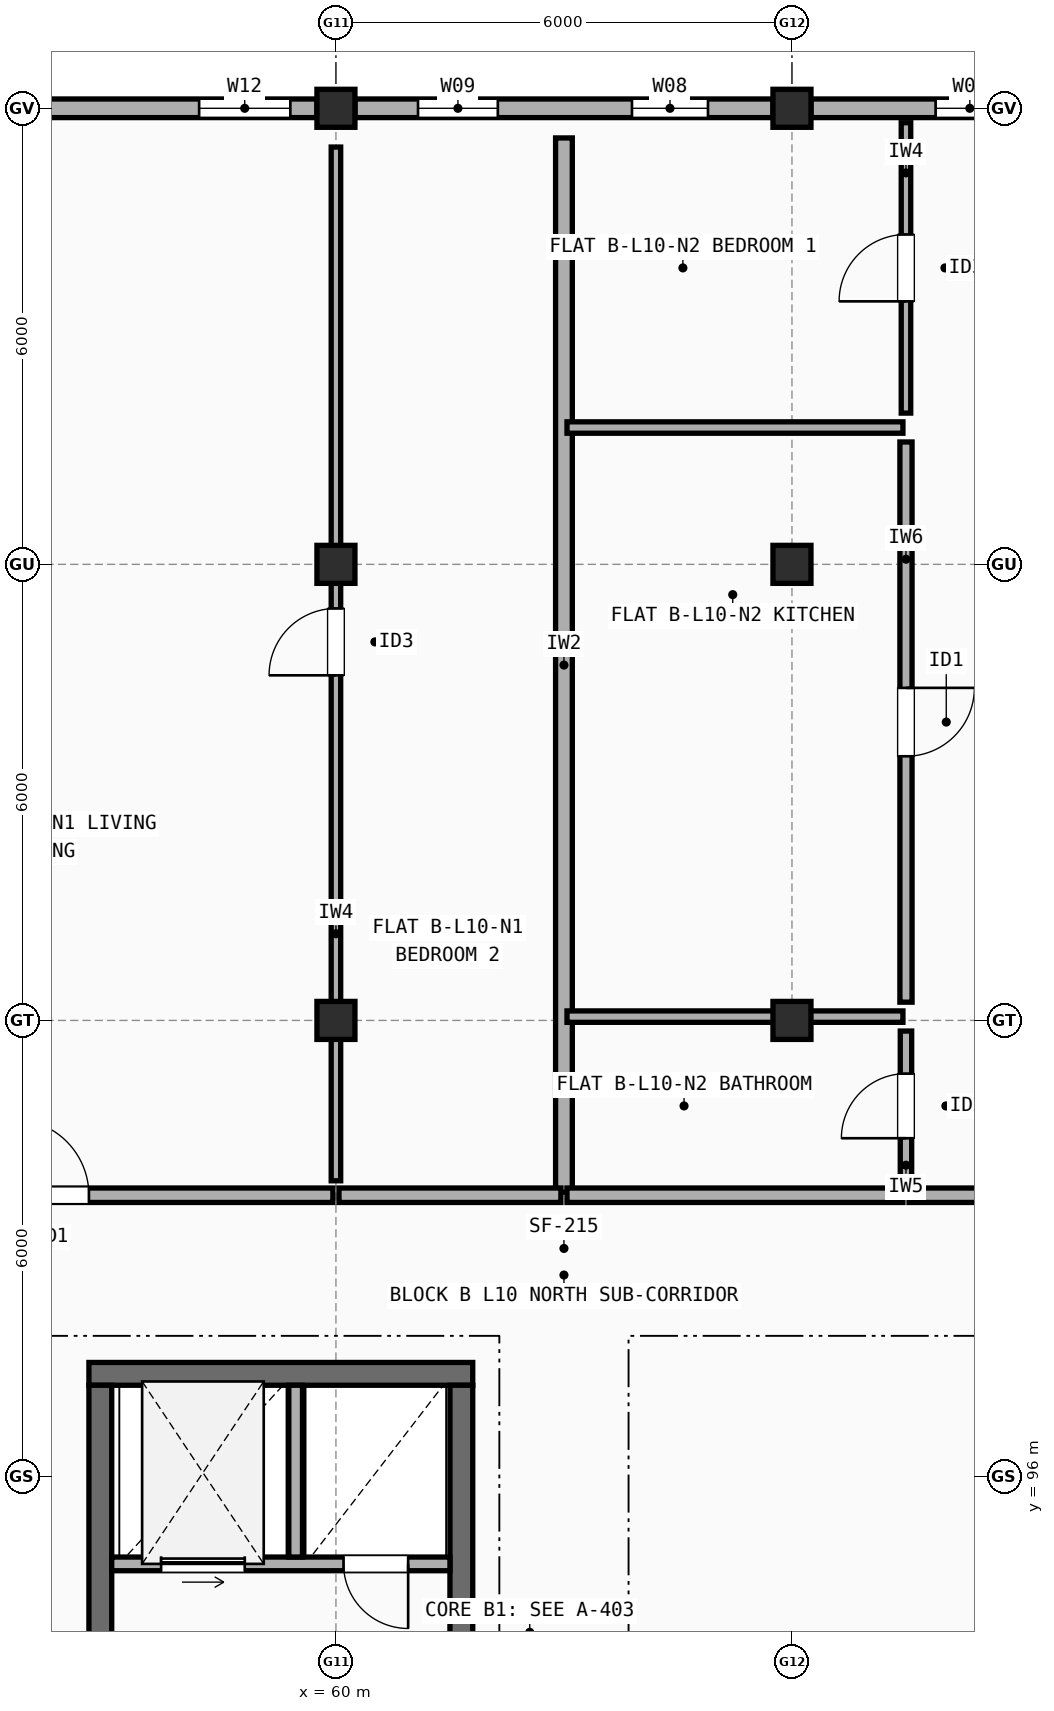
"""IFC4 building model, lengths in metres.
Left out: names, types, materials, properties, quantities, classifications, styles, units other than length and angle.
Written with IfcOpenShell. Run it as: python <this file> out.ifc"""

import sys

from ifc_helpers import new_model, si_unit, direction, frame, frame_2d, origin, origin_2d, place, context, subcontext, project, spatial, rectangle, extrude, element, fill, save


model = new_model("IFC4")
c1 = context("Model", 3, precision=1e-05, world=origin(), true_north=direction((0.0, 1.0)))
c2 = subcontext(c1, "Body", "Model", "MODEL_VIEW")
j1 = project(units=[si_unit("LENGTHUNIT", "METRE"), si_unit("PLANEANGLEUNIT", "RADIAN")], contexts=[c1])
p1 = place(None, origin())
s1 = spatial("IfcSite", under=j1, at=p1, CompositionType="ELEMENT")
p2 = place(p1, origin())
s2 = spatial("IfcBuilding", under=s1, at=p2, CompositionType="ELEMENT")
p3 = place(p2, frame((0.0, 0.0, 33.3)))
s3 = spatial("IfcBuildingStorey", under=s2, at=p3, CompositionType="ELEMENT", Elevation=33.3)
for number, where, z_axis, x_axis in (
    (1, (60.0, 102.0, 0.0), (0.0, 0.0, 1.0), (1.0, 0.0, 0.0)),
    (2, (60.0, 108.0, 0.0), (0.0, 0.0, 1.0), (1.0, 0.0, 0.0)),
    (3, (60.0, 114.0, 0.0), (0.0, 0.0, 1.0), (1.0, 0.0, 0.0)),
    (4, (66.0, 102.0, 0.0), (0.0, 0.0, 1.0), (1.0, 0.0, 0.0)),
    (5, (66.0, 108.0, 0.0), (0.0, 0.0, 1.0), (1.0, 0.0, 0.0)),
    (6, (66.0, 114.0, 0.0), (0.0, 0.0, 1.0), (1.0, 0.0, 0.0)),
):
    element("IfcColumn", number, at=place(p3, frame(where, z_axis=z_axis, x_axis=x_axis)), inside=s3, PredefinedType="COLUMN", context=c2, shape_type="SweptSolid", body=[
        extrude(rectangle(XDim=0.5, YDim=0.5, at=origin_2d()), origin(), (0.0, 0.0, 1.0), 2.99),
    ])
p4 = place(p3, frame((71.75, 114.0, 0.0), z_axis=(0.0, 0.0, 1.0), x_axis=(-1.0, 0.0, 0.0)))
e7 = element("IfcWall", 7, at=p4, inside=s3, PredefinedType="STANDARD", context=c2, shape_type="SweptSolid", body=[
    extrude(rectangle(XDim=5.5, YDim=0.245, at=frame_2d((2.75, 0.0))), origin(), (0.0, 0.0, 1.0), 2.472),
])
p5 = place(p4, frame((0.35, 0.0, 0.9)))
e8 = element("IfcOpeningElement", 8, at=p5, cuts=e7, PredefinedType="OPENING", context=c2, shape_type="SweptSolid", body=[
    extrude(rectangle(XDim=0.9, YDim=1.4, at=frame_2d((0.45, 0.7))), frame((0.0, 0.133, 0.0), z_axis=(0.0, -1.0, 0.0), x_axis=(1.0, 0.0, 0.0)), (0.0, 0.0, 1.0), 0.265),
])
p6 = place(p4, frame((2.96, 0.0, 0.9)))
e9 = element("IfcOpeningElement", 9, at=p6, cuts=e7, PredefinedType="OPENING", context=c2, shape_type="SweptSolid", body=[
    extrude(rectangle(XDim=0.9, YDim=1.4, at=frame_2d((0.45, 0.7))), frame((0.0, 0.133, 0.0), z_axis=(0.0, -1.0, 0.0), x_axis=(1.0, 0.0, 0.0)), (0.0, 0.0, 1.0), 0.265),
])
p7 = place(p3, frame((65.75, 114.0, 0.0), z_axis=(0.0, 0.0, 1.0), x_axis=(-1.0, 0.0, 0.0)))
e10 = element("IfcWall", 10, at=p7, inside=s3, PredefinedType="STANDARD", context=c2, shape_type="SweptSolid", body=[
    extrude(rectangle(XDim=5.5, YDim=0.245, at=frame_2d((2.75, 0.0))), origin(), (0.0, 0.0, 1.0), 2.472),
])
p8 = place(p7, frame((0.855, 0.0, 0.9)))
e11 = element("IfcOpeningElement", 11, at=p8, cuts=e10, PredefinedType="OPENING", context=c2, shape_type="SweptSolid", body=[
    extrude(rectangle(XDim=1.0, YDim=1.4, at=frame_2d((0.5, 0.7))), frame((0.0, 0.133, 0.0), z_axis=(0.0, -1.0, 0.0), x_axis=(1.0, 0.0, 0.0)), (0.0, 0.0, 1.0), 0.265),
])
p9 = place(p7, frame((3.62, 0.0, 0.9)))
e12 = element("IfcOpeningElement", 12, at=p9, cuts=e10, PredefinedType="OPENING", context=c2, shape_type="SweptSolid", body=[
    extrude(rectangle(XDim=1.05, YDim=1.35, at=frame_2d((0.525, 0.675))), frame((0.0, 0.133, 0.0), z_axis=(0.0, -1.0, 0.0), x_axis=(1.0, 0.0, 0.0)), (0.0, 0.0, 1.0), 0.265),
])
p10 = place(p3, frame((59.75, 114.0, 0.0), z_axis=(0.0, 0.0, 1.0), x_axis=(-1.0, 0.0, 0.0)))
e13 = element("IfcWall", 13, at=p10, inside=s3, PredefinedType="STANDARD", context=c2, shape_type="SweptSolid", body=[
    extrude(rectangle(XDim=5.5, YDim=0.245, at=frame_2d((2.75, 0.0))), origin(), (0.0, 0.0, 1.0), 2.472),
])
p11 = place(p10, frame((0.35, 0.0, 0.9)))
e14 = element("IfcOpeningElement", 14, at=p11, cuts=e13, PredefinedType="OPENING", context=c2, shape_type="SweptSolid", body=[
    extrude(rectangle(XDim=1.2, YDim=1.35, at=frame_2d((0.6, 0.675))), frame((0.0, 0.133, 0.0), z_axis=(0.0, -1.0, 0.0), x_axis=(1.0, 0.0, 0.0)), (0.0, 0.0, 1.0), 0.265),
])
p12 = place(p10, frame((3.95, 0.0, 0.9)))
e15 = element("IfcOpeningElement", 15, at=p12, cuts=e13, PredefinedType="OPENING", context=c2, shape_type="SweptSolid", body=[
    extrude(rectangle(XDim=1.2, YDim=1.35, at=frame_2d((0.6, 0.675))), frame((0.0, 0.133, 0.0), z_axis=(0.0, -1.0, 0.0), x_axis=(1.0, 0.0, 0.0)), (0.0, 0.0, 1.0), 0.265),
])
p13 = place(p3, frame((61.8, 97.35, 0.0), z_axis=(0.0, 0.0, 1.0), x_axis=(-1.0, 0.0, 0.0)))
e16 = element("IfcWall", 16, at=p13, inside=s3, PredefinedType="SHEAR", context=c2, shape_type="SweptSolid", body=[
    extrude(rectangle(XDim=5.05, YDim=0.3, at=frame_2d((2.525, 0.0))), origin(), (0.0, 0.0, 1.0), 2.99),
])
p14 = place(p3, frame((61.65, 90.75, 0.0), z_axis=(0.0, 0.0, 1.0), x_axis=(0.0, 1.0, 0.0)))
e17 = element("IfcWall", 17, at=p14, inside=s3, PredefinedType="SHEAR", context=c2, shape_type="SweptSolid", body=[
    extrude(rectangle(XDim=6.45, YDim=0.3, at=frame_2d((3.225, 0.0))), origin(), (0.0, 0.0, 1.0), 2.99),
])
p15 = place(p3, frame((56.9, 93.75, 0.0), z_axis=(0.0, 0.0, 1.0), x_axis=(0.0, 1.0, 0.0)))
e18 = element("IfcWall", 18, at=p15, inside=s3, PredefinedType="SHEAR", context=c2, shape_type="SweptSolid", body=[
    extrude(rectangle(XDim=3.45, YDim=0.3, at=frame_2d((1.725, 0.0))), origin(), (0.0, 0.0, 1.0), 2.99),
])
p16 = place(p3, frame((57.05, 94.85, 0.0), z_axis=(0.0, 0.0, 1.0), x_axis=(1.0, 0.0, 0.0)))
e19 = element("IfcWall", 19, at=p16, inside=s3, PredefinedType="SOLIDWALL", context=c2, shape_type="SweptSolid", body=[
    extrude(rectangle(XDim=4.45, YDim=0.18, at=frame_2d((2.225, 0.0))), origin(), (0.0, 0.0, 1.0), 2.99),
])
p17 = place(p16, frame((0.65, 0.0, 0.0)))
e20 = element("IfcOpeningElement", 20, at=p17, cuts=e19, PredefinedType="OPENING", context=c2, shape_type="SweptSolid", body=[
    extrude(rectangle(XDim=1.1, YDim=2.15, at=frame_2d((0.55, 1.075))), frame((0.0, 0.1, 0.0), z_axis=(0.0, -1.0, 0.0), x_axis=(1.0, 0.0, 0.0)), (0.0, 0.0, 1.0), 0.2),
])
p18 = place(p16, frame((3.05, 0.0, 0.0)))
e21 = element("IfcOpeningElement", 21, at=p18, cuts=e19, PredefinedType="OPENING", context=c2, shape_type="SweptSolid", body=[
    extrude(rectangle(XDim=0.85, YDim=2.1, at=frame_2d((0.425, 1.05))), frame((0.0, 0.1, 0.0), z_axis=(0.0, -1.0, 0.0), x_axis=(1.0, 0.0, 0.0)), (0.0, 0.0, 1.0), 0.2),
])
p19 = place(p3, frame((59.47, 94.94, 0.0), z_axis=(0.0, 0.0, 1.0), x_axis=(0.0, 1.0, 0.0)))
e22 = element("IfcWall", 22, at=p19, inside=s3, PredefinedType="SOLIDWALL", context=c2, shape_type="SweptSolid", body=[
    extrude(rectangle(XDim=2.26, YDim=0.18, at=frame_2d((1.13, 0.0))), origin(), (0.0, 0.0, 1.0), 2.99),
])
p20 = place(p3, frame((63.0, 99.74, 0.0), z_axis=(0.0, 0.0, 1.0), x_axis=(0.0, 1.0, 0.0)))
e23 = element("IfcWall", 23, at=p20, inside=s3, PredefinedType="SOLIDWALL", context=c2, shape_type="SweptSolid", body=[
    extrude(rectangle(XDim=13.87, YDim=0.22, at=frame_2d((6.935, 0.0))), origin(), (0.0, 0.0, 1.0), 2.472),
])
p21 = place(p3, frame((52.54, 99.7, 0.0), z_axis=(0.0, 0.0, 1.0), x_axis=(1.0, 0.0, 0.0)))
e24 = element("IfcWall", 24, at=p21, inside=s3, PredefinedType="SOLIDWALL", context=c2, shape_type="SweptSolid", body=[
    extrude(rectangle(XDim=7.42, YDim=0.19, at=frame_2d((3.71, 0.0))), origin(), (0.0, 0.0, 1.0), 2.508),
])
p22 = place(p21, frame((3.21, 0.0, 0.0)))
e25 = element("IfcOpeningElement", 25, at=p22, cuts=e24, PredefinedType="OPENING", context=c2, shape_type="SweptSolid", body=[
    extrude(rectangle(XDim=1.0, YDim=2.15, at=frame_2d((0.5, 1.075))), frame((0.0, 0.105, 0.0), z_axis=(0.0, -1.0, 0.0), x_axis=(1.0, 0.0, 0.0)), (0.0, 0.0, 1.0), 0.21),
])
p23 = place(p3, frame((60.04, 99.7, 0.0), z_axis=(0.0, 0.0, 1.0), x_axis=(1.0, 0.0, 0.0)))
e26 = element("IfcWall", 26, at=p23, inside=s3, PredefinedType="SOLIDWALL", context=c2, shape_type="SweptSolid", body=[
    extrude(rectangle(XDim=2.92, YDim=0.19, at=frame_2d((1.46, 0.0))), origin(), (0.0, 0.0, 1.0), 2.508),
])
p24 = place(p3, frame((60.0, 99.89, 0.0), z_axis=(0.0, 0.0, 1.0), x_axis=(0.0, 1.0, 0.0)))
e27 = element("IfcWall", 27, at=p24, inside=s3, PredefinedType="PARTITIONING", context=c2, shape_type="SweptSolid", body=[
    extrude(rectangle(XDim=13.6, YDim=0.125, at=frame_2d((6.8, 0.0))), origin(), (0.0, 0.0, 1.0), 2.508),
])
p25 = place(p24, frame((6.65, 0.0, 0.0)))
e28 = element("IfcOpeningElement", 28, at=p25, cuts=e27, PredefinedType="OPENING", context=c2, shape_type="SweptSolid", body=[
    extrude(rectangle(XDim=0.88, YDim=2.1, at=frame_2d((0.44, 1.05))), frame((0.0, 0.073, 0.0), z_axis=(0.0, -1.0, 0.0), x_axis=(1.0, 0.0, 0.0)), (0.0, 0.0, 1.0), 0.145),
])
p26 = place(p3, frame((63.04, 99.7, 0.0), z_axis=(0.0, 0.0, 1.0), x_axis=(1.0, 0.0, 0.0)))
e29 = element("IfcWall", 29, at=p26, inside=s3, PredefinedType="SOLIDWALL", context=c2, shape_type="SweptSolid", body=[
    extrude(rectangle(XDim=4.42, YDim=0.19, at=frame_2d((2.21, 0.0))), origin(), (0.0, 0.0, 1.0), 2.99),
])
p27 = place(p3, frame((67.54, 99.7, 0.0), z_axis=(0.0, 0.0, 1.0), x_axis=(1.0, 0.0, 0.0)))
e30 = element("IfcWall", 30, at=p27, inside=s3, PredefinedType="SOLIDWALL", context=c2, shape_type="SweptSolid", body=[
    extrude(rectangle(XDim=7.42, YDim=0.19, at=frame_2d((3.71, 0.0))), origin(), (0.0, 0.0, 1.0), 2.99),
])
p28 = place(p27, frame((3.185, 0.0, 0.0)))
e31 = element("IfcOpeningElement", 31, at=p28, cuts=e30, PredefinedType="OPENING", context=c2, shape_type="SweptSolid", body=[
    extrude(rectangle(XDim=1.05, YDim=2.15, at=frame_2d((0.525, 1.075))), frame((0.0, 0.105, 0.0), z_axis=(0.0, -1.0, 0.0), x_axis=(1.0, 0.0, 0.0)), (0.0, 0.0, 1.0), 0.21),
])
p29 = place(p3, frame((67.5, 109.99, 0.0), z_axis=(0.0, 0.0, 1.0), x_axis=(0.0, 1.0, 0.0)))
e32 = element("IfcWall", 32, at=p29, inside=s3, PredefinedType="PARTITIONING", context=c2, shape_type="SweptSolid", body=[
    extrude(rectangle(XDim=3.82, YDim=0.125, at=frame_2d((1.91, 0.0))), origin(), (0.0, 0.0, 1.0), 2.99),
])
p30 = place(p29, frame((1.47, 0.0, 0.0)))
e33 = element("IfcOpeningElement", 33, at=p30, cuts=e32, PredefinedType="OPENING", context=c2, shape_type="SweptSolid", body=[
    extrude(rectangle(XDim=0.88, YDim=2.1, at=frame_2d((0.44, 1.05))), frame((0.0, 0.073, 0.0), z_axis=(0.0, -1.0, 0.0), x_axis=(1.0, 0.0, 0.0)), (0.0, 0.0, 1.0), 0.145),
])
p31 = place(p3, frame((67.5, 102.24, 0.0), z_axis=(0.0, 0.0, 1.0), x_axis=(0.0, 1.0, 0.0)))
e34 = element("IfcWall", 34, at=p31, inside=s3, PredefinedType="PLUMBINGWALL", context=c2, shape_type="SweptSolid", body=[
    extrude(rectangle(XDim=7.37, YDim=0.16, at=frame_2d((3.685, 0.0))), origin(), (0.0, 0.0, 1.0), 2.472),
])
p32 = place(p31, frame((3.235, 0.0, 0.0)))
e35 = element("IfcOpeningElement", 35, at=p32, cuts=e34, PredefinedType="OPENING", context=c2, shape_type="SweptSolid", body=[
    extrude(rectangle(XDim=0.9, YDim=2.1, at=frame_2d((0.45, 1.05))), frame((0.0, 0.09, 0.0), z_axis=(0.0, -1.0, 0.0), x_axis=(1.0, 0.0, 0.0)), (0.0, 0.0, 1.0), 0.18),
])
p33 = place(p3, frame((67.5, 99.89, 0.0), z_axis=(0.0, 0.0, 1.0), x_axis=(0.0, 1.0, 0.0)))
e36 = element("IfcWall", 36, at=p33, inside=s3, PredefinedType="PARTITIONING", context=c2, shape_type="SweptSolid", body=[
    extrude(rectangle(XDim=1.97, YDim=0.15, at=frame_2d((0.985, 0.0))), origin(), (0.0, 0.0, 1.0), 2.99),
])
p34 = place(p33, frame((0.56, 0.0, 0.0)))
e37 = element("IfcOpeningElement", 37, at=p34, cuts=e36, PredefinedType="OPENING", context=c2, shape_type="SweptSolid", body=[
    extrude(rectangle(XDim=0.85, YDim=2.1, at=frame_2d((0.425, 1.05))), frame((0.0, 0.085, 0.0), z_axis=(0.0, -1.0, 0.0), x_axis=(1.0, 0.0, 0.0)), (0.0, 0.0, 1.0), 0.17),
])
p35 = place(p3, frame((63.04, 109.8, 0.0), z_axis=(0.0, 0.0, 1.0), x_axis=(1.0, 0.0, 0.0)))
e38 = element("IfcWall", 38, at=p35, inside=s3, PredefinedType="PARTITIONING", context=c2, shape_type="SweptSolid", body=[
    extrude(rectangle(XDim=4.42, YDim=0.15, at=frame_2d((2.21, 0.0))), origin(), (0.0, 0.0, 1.0), 2.508),
])
p36 = place(p3, frame((63.04, 102.05, 0.0), z_axis=(0.0, 0.0, 1.0), x_axis=(1.0, 0.0, 0.0)))
e39 = element("IfcWall", 39, at=p36, inside=s3, PredefinedType="PARTITIONING", context=c2, shape_type="SweptSolid", body=[
    extrude(rectangle(XDim=4.42, YDim=0.15, at=frame_2d((2.21, 0.0))), origin(), (0.0, 0.0, 1.0), 2.472),
])
p37 = place(p6, origin())
e40 = element("IfcWindow", 40, at=p37, inside=s3, PartitioningType="SINGLE_PANEL", PredefinedType="WINDOW", context=c2, shape_type="SweptSolid", body=[
    extrude(rectangle(XDim=0.9, YDim=1.4, at=frame_2d((0.45, 0.7))), frame((0.0, 0.03, 0.0), z_axis=(0.0, -1.0, 0.0), x_axis=(1.0, 0.0, 0.0)), (0.0, 0.0, 1.0), 0.06),
])
fill(e9, e40)
p38 = place(p8, origin())
e41 = element("IfcWindow", 41, at=p38, inside=s3, PartitioningType="SINGLE_PANEL", PredefinedType="WINDOW", context=c2, shape_type="SweptSolid", body=[
    extrude(rectangle(XDim=1.0, YDim=1.4, at=frame_2d((0.5, 0.7))), frame((0.0, 0.03, 0.0), z_axis=(0.0, -1.0, 0.0), x_axis=(1.0, 0.0, 0.0)), (0.0, 0.0, 1.0), 0.06),
])
fill(e11, e41)
p39 = place(p9, origin())
e42 = element("IfcWindow", 42, at=p39, inside=s3, PartitioningType="SINGLE_PANEL", PredefinedType="WINDOW", context=c2, shape_type="SweptSolid", body=[
    extrude(rectangle(XDim=1.05, YDim=1.35, at=frame_2d((0.525, 0.675))), frame((0.0, 0.03, 0.0), z_axis=(0.0, -1.0, 0.0), x_axis=(1.0, 0.0, 0.0)), (0.0, 0.0, 1.0), 0.06),
])
fill(e12, e42)
p40 = place(p11, origin())
e43 = element("IfcWindow", 43, at=p40, inside=s3, PartitioningType="SINGLE_PANEL", PredefinedType="WINDOW", context=c2, shape_type="SweptSolid", body=[
    extrude(rectangle(XDim=1.2, YDim=1.35, at=frame_2d((0.6, 0.675))), frame((0.0, 0.03, 0.0), z_axis=(0.0, -1.0, 0.0), x_axis=(1.0, 0.0, 0.0)), (0.0, 0.0, 1.0), 0.06),
])
fill(e14, e43)
p41 = place(p17, origin())
e44 = element("IfcDoor", 44, at=p41, inside=s3, OperationType="SLIDING_TO_LEFT", PredefinedType="DOOR", context=c2, shape_type="SweptSolid", body=[
    extrude(rectangle(XDim=1.1, YDim=2.15, at=frame_2d((0.55, 1.075))), frame((0.0, 0.025, 0.0), z_axis=(0.0, -1.0, 0.0), x_axis=(1.0, 0.0, 0.0)), (0.0, 0.0, 1.0), 0.05),
])
fill(e20, e44)
p42 = place(p18, frame((0.85, 0.0, 0.0), z_axis=(0.0, 0.0, 1.0), x_axis=(-1.0, 0.0, 0.0)))
e45 = element("IfcDoor", 45, at=p42, inside=s3, OperationType="SINGLE_SWING_RIGHT", PredefinedType="DOOR", context=c2, shape_type="SweptSolid", body=[
    extrude(rectangle(XDim=0.85, YDim=2.1, at=frame_2d((0.425, 1.05))), frame((0.0, 0.025, 0.0), z_axis=(0.0, -1.0, 0.0), x_axis=(1.0, 0.0, 0.0)), (0.0, 0.0, 1.0), 0.05),
])
fill(e21, e45)
p43 = place(p22, origin())
e46 = element("IfcDoor", 46, at=p43, inside=s3, OperationType="SINGLE_SWING_LEFT", PredefinedType="DOOR", context=c2, shape_type="SweptSolid", body=[
    extrude(rectangle(XDim=1.0, YDim=2.15, at=frame_2d((0.5, 1.075))), frame((0.0, 0.025, 0.0), z_axis=(0.0, -1.0, 0.0), x_axis=(1.0, 0.0, 0.0)), (0.0, 0.0, 1.0), 0.05),
])
fill(e25, e46)
p44 = place(p25, origin())
e47 = element("IfcDoor", 47, at=p44, inside=s3, OperationType="SINGLE_SWING_LEFT", PredefinedType="DOOR", context=c2, shape_type="SweptSolid", body=[
    extrude(rectangle(XDim=0.88, YDim=2.1, at=frame_2d((0.44, 1.05))), frame((0.0, 0.025, 0.0), z_axis=(0.0, -1.0, 0.0), x_axis=(1.0, 0.0, 0.0)), (0.0, 0.0, 1.0), 0.05),
])
fill(e28, e47)
p45 = place(p30, origin())
e48 = element("IfcDoor", 48, at=p45, inside=s3, OperationType="SINGLE_SWING_LEFT", PredefinedType="DOOR", context=c2, shape_type="SweptSolid", body=[
    extrude(rectangle(XDim=0.88, YDim=2.1, at=frame_2d((0.44, 1.05))), frame((0.0, 0.025, 0.0), z_axis=(0.0, -1.0, 0.0), x_axis=(1.0, 0.0, 0.0)), (0.0, 0.0, 1.0), 0.05),
])
fill(e33, e48)
p46 = place(p32, origin())
e49 = element("IfcDoor", 49, at=p46, inside=s3, OperationType="SINGLE_SWING_RIGHT", PredefinedType="DOOR", context=c2, shape_type="SweptSolid", body=[
    extrude(rectangle(XDim=0.9, YDim=2.1, at=frame_2d((0.45, 1.05))), frame((0.0, 0.025, 0.0), z_axis=(0.0, -1.0, 0.0), x_axis=(1.0, 0.0, 0.0)), (0.0, 0.0, 1.0), 0.05),
])
fill(e35, e49)
p47 = place(p34, origin())
e50 = element("IfcDoor", 50, at=p47, inside=s3, OperationType="SINGLE_SWING_LEFT", PredefinedType="DOOR", context=c2, shape_type="SweptSolid", body=[
    extrude(rectangle(XDim=0.85, YDim=2.1, at=frame_2d((0.425, 1.05))), frame((0.0, 0.025, 0.0), z_axis=(0.0, -1.0, 0.0), x_axis=(1.0, 0.0, 0.0)), (0.0, 0.0, 1.0), 0.05),
])
fill(e37, e50)
save(model, sys.argv[1])
